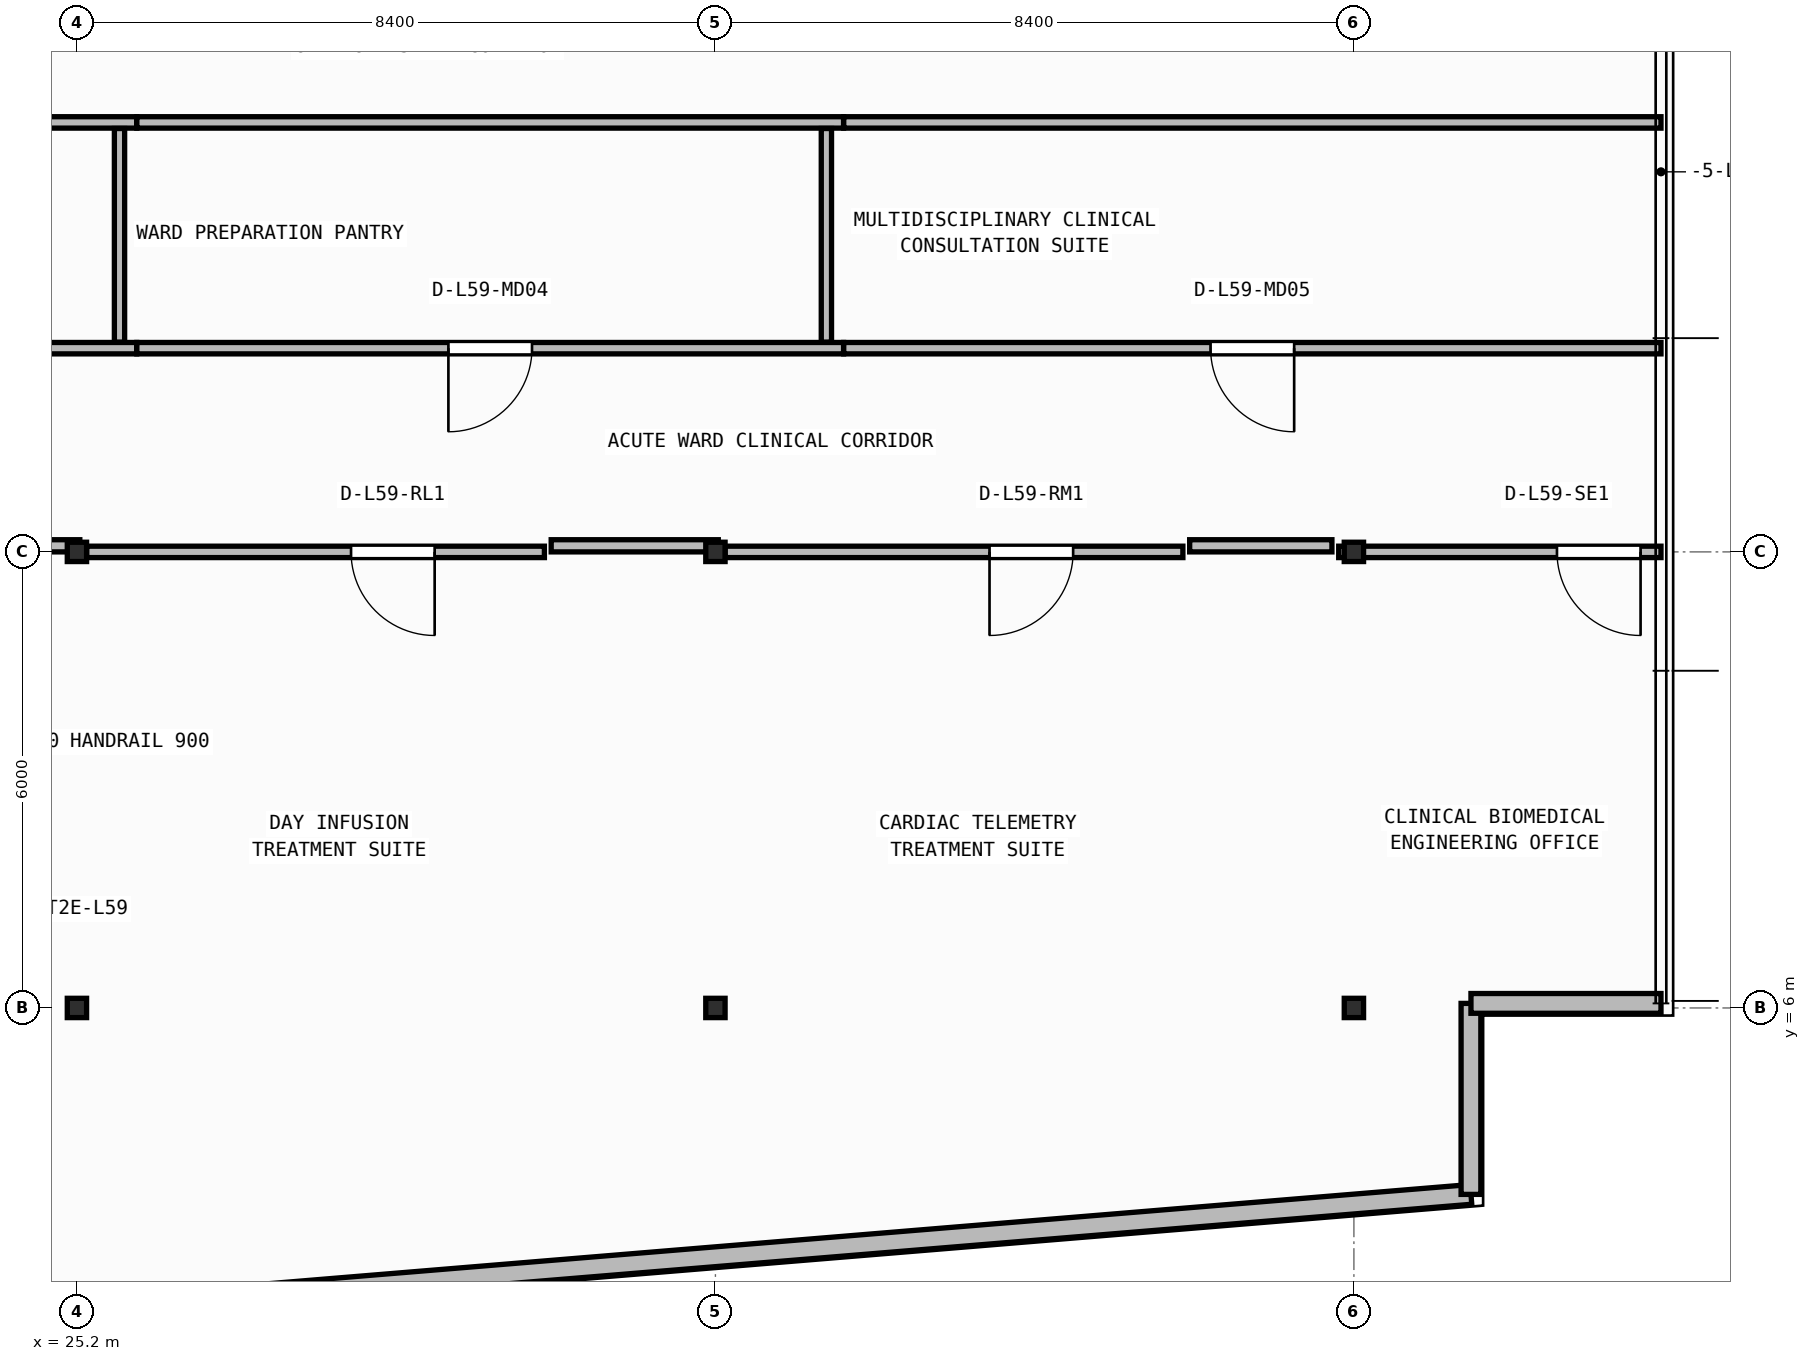
"""IFC4 building model, lengths in metres.
Left out: names, types, materials, properties, quantities, classifications, styles, units other than length and angle.
Written with IfcOpenShell. Run it as: python <this file> out.ifc"""

import sys

from ifc_helpers import new_model, si_unit, direction, frame, frame_2d, origin, origin_2d, place, context, subcontext, project, spatial, rectangle, i_section, extrude, element, fill, save


model = new_model("IFC4")
c1 = context("Model", 3, precision=1e-05, world=origin(), true_north=direction((0.0, 1.0)))
c2 = subcontext(c1, "Body", "Model", "MODEL_VIEW")
j1 = project(units=[si_unit("LENGTHUNIT", "METRE"), si_unit("PLANEANGLEUNIT", "RADIAN")], contexts=[c1])
p1 = place(None, origin())
s1 = spatial("IfcSite", under=j1, at=p1, CompositionType="ELEMENT")
p2 = place(p1, origin())
s2 = spatial("IfcBuilding", under=s1, at=p2, CompositionType="ELEMENT")
p3 = place(p2, frame((0.0, 0.0, 240.75)))
s3 = spatial("IfcBuildingStorey", under=s2, at=p3, CompositionType="ELEMENT", Elevation=240.75)
for number, where, z_axis, x_axis in (
    (1, (25.2, 6.0, 0.0), (0.0, 0.0, 1.0), (1.0, 0.0, 0.0)),
    (2, (33.6, 6.0, 0.0), (0.0, 0.0, 1.0), (1.0, 0.0, 0.0)),
    (3, (42.0, 6.0, 0.0), (0.0, 0.0, 1.0), (1.0, 0.0, 0.0)),
    (4, (25.2, 12.0, 0.0), (0.0, 0.0, 1.0), (1.0, 0.0, 0.0)),
    (5, (33.6, 12.0, 0.0), (0.0, 0.0, 1.0), (1.0, 0.0, 0.0)),
    (6, (42.0, 12.0, 0.0), (0.0, 0.0, 1.0), (1.0, 0.0, 0.0)),
):
    element("IfcColumn", number, at=place(p3, frame(where, z_axis=z_axis, x_axis=x_axis)), inside=s3, PredefinedType="COLUMN", context=c2, shape_type="SweptSolid", body=[
        extrude(i_section(OverallWidth=0.254, OverallDepth=0.254, WebThickness=0.009, FlangeThickness=0.014, FilletRadius=0.013, at=origin_2d()), origin(), (0.0, 0.0, 1.0), 3.95),
    ])
p4 = place(p3, frame((2.66, 0.174, 0.0), z_axis=(0.0, 0.0, 1.0), x_axis=(0.996611813627, 0.082248969229, 0.0)))
e7 = element("IfcWall", 7, at=p4, inside=s3, PredefinedType="STANDARD", context=c2, shape_type="SweptSolid", body=[
    extrude(rectangle(XDim=41.019, YDim=0.26, at=frame_2d((20.51, 0.0))), origin(), (0.0, 0.0, 1.0), 3.71),
])
p5 = place(p4, frame((19.31, 0.0, 0.9)))
e8 = element("IfcOpeningElement", 8, at=p5, cuts=e7, PredefinedType="OPENING", context=c2, shape_type="SweptSolid", body=[
    extrude(rectangle(XDim=2.4, YDim=1.65, at=frame_2d((1.2, 0.825))), frame((0.0, 0.14, 0.0), z_axis=(0.0, -1.0, 0.0), x_axis=(1.0, 0.0, 0.0)), (0.0, 0.0, 1.0), 0.28),
])
p6 = place(p3, frame((43.54, 3.547, 0.0), z_axis=(0.0, 0.0, 1.0), x_axis=(0.0, 1.0, 0.0)))
e9 = element("IfcWall", 9, at=p6, inside=s3, PredefinedType="STANDARD", context=c2, shape_type="SweptSolid", body=[
    extrude(rectangle(XDim=2.513, YDim=0.26, at=frame_2d((1.256, 0.0))), origin(), (0.0, 0.0, 1.0), 3.71),
])
p7 = place(p3, frame((43.54, 6.06, 0.0), z_axis=(0.0, 0.0, 1.0), x_axis=(1.0, 0.0, 0.0)))
e10 = element("IfcWall", 10, at=p7, inside=s3, PredefinedType="STANDARD", context=c2, shape_type="SweptSolid", body=[
    extrude(rectangle(XDim=2.5, YDim=0.26, at=frame_2d((1.25, 0.0))), origin(), (0.0, 0.0, 1.0), 3.71),
])
p8 = place(p3, frame((31.35, 12.0, 0.0), z_axis=(0.0, 0.0, 1.0), x_axis=(-1.0, 0.0, 0.0)))
e11 = element("IfcWall", 11, at=p8, inside=s3, PredefinedType="PARTITIONING", context=c2, shape_type="SweptSolid", body=[
    extrude(rectangle(XDim=6.023, YDim=0.15, at=frame_2d((3.012, 0.0))), origin(), (0.0, 0.0, 1.0), 3.157),
])
p9 = place(p8, frame((1.444, 0.0, 0.0)))
e12 = element("IfcOpeningElement", 12, at=p9, cuts=e11, PredefinedType="OPENING", context=c2, shape_type="SweptSolid", body=[
    extrude(rectangle(XDim=1.1, YDim=2.1, at=frame_2d((0.55, 1.05))), frame((0.0, 0.085, 0.0), z_axis=(0.0, -1.0, 0.0), x_axis=(1.0, 0.0, 0.0)), (0.0, 0.0, 1.0), 0.17),
])
p10 = place(p3, frame((39.75, 12.0, 0.0), z_axis=(0.0, 0.0, 1.0), x_axis=(-1.0, 0.0, 0.0)))
e13 = element("IfcWall", 13, at=p10, inside=s3, PredefinedType="PARTITIONING", context=c2, shape_type="SweptSolid", body=[
    extrude(rectangle(XDim=6.023, YDim=0.15, at=frame_2d((3.011, 0.0))), origin(), (0.0, 0.0, 1.0), 3.157),
])
p11 = place(p10, frame((1.444, 0.0, 0.0)))
e14 = element("IfcOpeningElement", 14, at=p11, cuts=e13, PredefinedType="OPENING", context=c2, shape_type="SweptSolid", body=[
    extrude(rectangle(XDim=1.1, YDim=2.1, at=frame_2d((0.55, 1.05))), frame((0.0, 0.085, 0.0), z_axis=(0.0, -1.0, 0.0), x_axis=(1.0, 0.0, 0.0)), (0.0, 0.0, 1.0), 0.17),
])
p12 = place(p3, frame((46.04, 12.0, 0.0), z_axis=(0.0, 0.0, 1.0), x_axis=(-1.0, 0.0, 0.0)))
e15 = element("IfcWall", 15, at=p12, inside=s3, PredefinedType="PARTITIONING", context=c2, shape_type="SweptSolid", body=[
    extrude(rectangle(XDim=4.24, YDim=0.15, at=frame_2d((2.12, 0.0))), origin(), (0.0, 0.0, 1.0), 3.157),
])
p13 = place(p12, frame((0.269, 0.0, 0.0)))
e16 = element("IfcOpeningElement", 16, at=p13, cuts=e15, PredefinedType="OPENING", context=c2, shape_type="SweptSolid", body=[
    extrude(rectangle(XDim=1.1, YDim=2.1, at=frame_2d((0.55, 1.05))), frame((0.0, 0.085, 0.0), z_axis=(0.0, -1.0, 0.0), x_axis=(1.0, 0.0, 0.0)), (0.0, 0.0, 1.0), 0.17),
])
p14 = place(p3, frame((25.986, 14.68, 0.0), z_axis=(0.0, 0.0, 1.0), x_axis=(-1.0, 0.0, 0.0)))
e17 = element("IfcWall", 17, at=p14, inside=s3, PredefinedType="PARTITIONING", context=c2, shape_type="SweptSolid", body=[
    extrude(rectangle(XDim=6.788, YDim=0.15, at=frame_2d((3.394, 0.0))), origin(), (0.0, 0.0, 1.0), 3.71),
])
p15 = place(p14, frame((2.844, 0.0, 0.0)))
e18 = element("IfcOpeningElement", 18, at=p15, cuts=e17, PredefinedType="OPENING", context=c2, shape_type="SweptSolid", body=[
    extrude(rectangle(XDim=1.1, YDim=2.1, at=frame_2d((0.55, 1.05))), frame((0.0, 0.085, 0.0), z_axis=(0.0, -1.0, 0.0), x_axis=(1.0, 0.0, 0.0)), (0.0, 0.0, 1.0), 0.17),
])
p16 = place(p3, frame((35.286, 14.68, 0.0), z_axis=(0.0, 0.0, 1.0), x_axis=(-1.0, 0.0, 0.0)))
e19 = element("IfcWall", 19, at=p16, inside=s3, PredefinedType="PARTITIONING", context=c2, shape_type="SweptSolid", body=[
    extrude(rectangle(XDim=9.298, YDim=0.15, at=frame_2d((4.649, 0.0))), origin(), (0.0, 0.0, 1.0), 3.71),
])
p17 = place(p16, frame((4.099, 0.0, 0.0)))
e20 = element("IfcOpeningElement", 20, at=p17, cuts=e19, PredefinedType="OPENING", context=c2, shape_type="SweptSolid", body=[
    extrude(rectangle(XDim=1.1, YDim=2.1, at=frame_2d((0.55, 1.05))), frame((0.0, 0.085, 0.0), z_axis=(0.0, -1.0, 0.0), x_axis=(1.0, 0.0, 0.0)), (0.0, 0.0, 1.0), 0.17),
])
p18 = place(p3, frame((46.04, 14.68, 0.0), z_axis=(0.0, 0.0, 1.0), x_axis=(-1.0, 0.0, 0.0)))
e21 = element("IfcWall", 21, at=p18, inside=s3, PredefinedType="PARTITIONING", context=c2, shape_type="SweptSolid", body=[
    extrude(rectangle(XDim=10.752, YDim=0.15, at=frame_2d((5.376, 0.0))), origin(), (0.0, 0.0, 1.0), 3.71),
])
p19 = place(p18, frame((4.826, 0.0, 0.0)))
e22 = element("IfcOpeningElement", 22, at=p19, cuts=e21, PredefinedType="OPENING", context=c2, shape_type="SweptSolid", body=[
    extrude(rectangle(XDim=1.1, YDim=2.1, at=frame_2d((0.55, 1.05))), frame((0.0, 0.085, 0.0), z_axis=(0.0, -1.0, 0.0), x_axis=(1.0, 0.0, 0.0)), (0.0, 0.0, 1.0), 0.17),
])
p20 = place(p3, frame((19.198, 17.65, 0.0), z_axis=(0.0, 0.0, 1.0), x_axis=(1.0, 0.0, 0.0)))
e23 = element("IfcWall", 23, at=p20, inside=s3, PredefinedType="PARTITIONING", context=c2, shape_type="SweptSolid", body=[
    extrude(rectangle(XDim=6.788, YDim=0.15, at=frame_2d((3.394, 0.0))), origin(), (0.0, 0.0, 1.0), 3.71),
])
p21 = place(p3, frame((25.988, 17.65, 0.0), z_axis=(0.0, 0.0, 1.0), x_axis=(1.0, 0.0, 0.0)))
e24 = element("IfcWall", 24, at=p21, inside=s3, PredefinedType="PARTITIONING", context=c2, shape_type="SweptSolid", body=[
    extrude(rectangle(XDim=9.298, YDim=0.15, at=frame_2d((4.649, 0.0))), origin(), (0.0, 0.0, 1.0), 3.71),
])
p22 = place(p3, frame((35.288, 17.65, 0.0), z_axis=(0.0, 0.0, 1.0), x_axis=(1.0, 0.0, 0.0)))
e25 = element("IfcWall", 25, at=p22, inside=s3, PredefinedType="PARTITIONING", context=c2, shape_type="SweptSolid", body=[
    extrude(rectangle(XDim=10.752, YDim=0.15, at=frame_2d((5.376, 0.0))), origin(), (0.0, 0.0, 1.0), 3.71),
])
for number, where, z_axis, x_axis in (
    (26, (25.76, 14.76, 0.0), (0.0, 0.0, 1.0), (0.0, 1.0, 0.0)),
    (27, (35.06, 14.76, 0.0), (0.0, 0.0, 1.0), (0.0, 1.0, 0.0)),
):
    element("IfcWall", number, at=place(p3, frame(where, z_axis=z_axis, x_axis=x_axis)), inside=s3, PredefinedType="PARTITIONING", context=c2, shape_type="SweptSolid", body=[
        extrude(rectangle(XDim=2.81, YDim=0.135, at=frame_2d((1.405, 0.0))), origin(), (0.0, 0.0, 1.0), 3.71),
    ])
p23 = place(p3, frame((24.02, 12.08, 0.0), z_axis=(0.0, 0.0, 1.0), x_axis=(1.0, 0.0, 0.0)))
e28 = element("IfcWall", 28, at=p23, inside=s3, PredefinedType="PARTITIONING", context=c2, shape_type="SweptSolid", body=[
    extrude(rectangle(XDim=1.218, YDim=0.16, at=frame_2d((0.609, 0.0))), origin(), (0.0, 0.0, 1.0), 3.157),
])
p24 = place(p3, frame((31.439, 12.08, 0.0), z_axis=(0.0, 0.0, 1.0), x_axis=(1.0, 0.0, 0.0)))
e29 = element("IfcWall", 29, at=p24, inside=s3, PredefinedType="PARTITIONING", context=c2, shape_type="SweptSolid", body=[
    extrude(rectangle(XDim=2.198, YDim=0.16, at=frame_2d((1.099, 0.0))), origin(), (0.0, 0.0, 1.0), 3.157),
])
p25 = place(p3, frame((39.839, 12.08, 0.0), z_axis=(0.0, 0.0, 1.0), x_axis=(1.0, 0.0, 0.0)))
e30 = element("IfcWall", 30, at=p25, inside=s3, PredefinedType="PARTITIONING", context=c2, shape_type="SweptSolid", body=[
    extrude(rectangle(XDim=1.871, YDim=0.16, at=frame_2d((0.936, 0.0))), origin(), (0.0, 0.0, 1.0), 3.157),
])
p26 = place(p9, origin())
e31 = element("IfcDoor", 31, at=p26, inside=s3, OperationType="SINGLE_SWING_LEFT", PredefinedType="DOOR", context=c2, shape_type="SweptSolid", body=[
    extrude(rectangle(XDim=1.1, YDim=2.1, at=frame_2d((0.55, 1.05))), frame((0.0, 0.025, 0.0), z_axis=(0.0, -1.0, 0.0), x_axis=(1.0, 0.0, 0.0)), (0.0, 0.0, 1.0), 0.05),
])
fill(e12, e31)
p27 = place(p11, origin())
e32 = element("IfcDoor", 32, at=p27, inside=s3, OperationType="SINGLE_SWING_RIGHT", PredefinedType="DOOR", context=c2, shape_type="SweptSolid", body=[
    extrude(rectangle(XDim=1.1, YDim=2.1, at=frame_2d((0.55, 1.05))), frame((0.0, 0.025, 0.0), z_axis=(0.0, -1.0, 0.0), x_axis=(1.0, 0.0, 0.0)), (0.0, 0.0, 1.0), 0.05),
])
fill(e14, e32)
p28 = place(p13, origin())
e33 = element("IfcDoor", 33, at=p28, inside=s3, OperationType="SINGLE_SWING_LEFT", PredefinedType="DOOR", context=c2, shape_type="SweptSolid", body=[
    extrude(rectangle(XDim=1.1, YDim=2.1, at=frame_2d((0.55, 1.05))), frame((0.0, 0.025, 0.0), z_axis=(0.0, -1.0, 0.0), x_axis=(1.0, 0.0, 0.0)), (0.0, 0.0, 1.0), 0.05),
])
fill(e16, e33)
p29 = place(p17, origin())
e34 = element("IfcDoor", 34, at=p29, inside=s3, OperationType="SINGLE_SWING_RIGHT", PredefinedType="DOOR", context=c2, shape_type="SweptSolid", body=[
    extrude(rectangle(XDim=1.1, YDim=2.1, at=frame_2d((0.55, 1.05))), frame((0.0, 0.025, 0.0), z_axis=(0.0, -1.0, 0.0), x_axis=(1.0, 0.0, 0.0)), (0.0, 0.0, 1.0), 0.05),
])
fill(e20, e34)
p30 = place(p19, origin())
e35 = element("IfcDoor", 35, at=p30, inside=s3, OperationType="SINGLE_SWING_LEFT", PredefinedType="DOOR", context=c2, shape_type="SweptSolid", body=[
    extrude(rectangle(XDim=1.1, YDim=2.1, at=frame_2d((0.55, 1.05))), frame((0.0, 0.025, 0.0), z_axis=(0.0, -1.0, 0.0), x_axis=(1.0, 0.0, 0.0)), (0.0, 0.0, 1.0), 0.05),
])
fill(e22, e35)
save(model, sys.argv[1])
